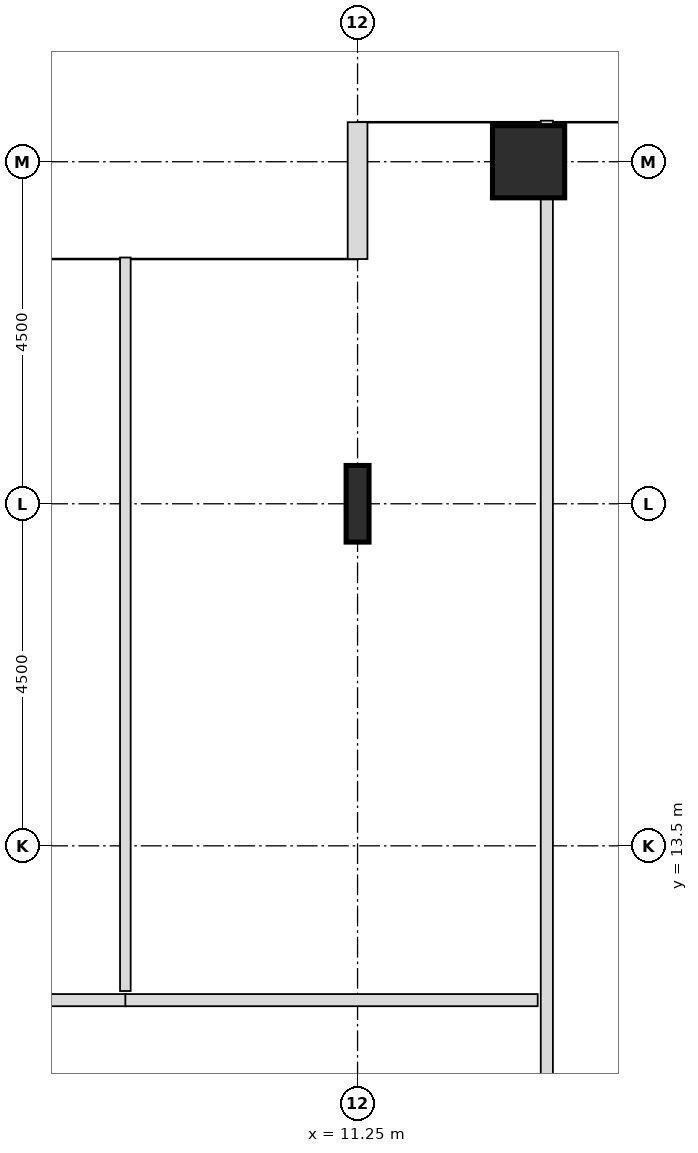
"""IFC4 building model, lengths in metres.
Left out: names, types, materials, properties, quantities, classifications, styles, units other than length and angle.
Written with IfcOpenShell. Run it as: python <this file> out.ifc"""

import sys

from ifc_helpers import new_model, si_unit, direction, frame, frame_2d, origin, origin_2d, place, context, subcontext, project, spatial, rectangle, hollow_rectangle, i_section, extrude, source, transform, mapped, element, fill, save


model = new_model("IFC4")
c1 = context("Model", 3, precision=1e-05, world=origin(), true_north=direction((0.0, 1.0)))
c2 = subcontext(c1, "Body", "Model", "MODEL_VIEW")
j1 = project(units=[si_unit("LENGTHUNIT", "METRE"), si_unit("PLANEANGLEUNIT", "RADIAN")], contexts=[c1])
p1 = place(None, origin())
s1 = spatial("IfcSite", under=j1, at=p1, CompositionType="ELEMENT")
p2 = place(p1, origin())
s2 = spatial("IfcBuilding", under=s1, at=p2, CompositionType="ELEMENT")
p3 = place(p2, frame((0.0, 0.0, 40.6)))
s3 = spatial("IfcBuildingStorey", under=s2, at=p3, CompositionType="ELEMENT", Elevation=40.6)
m1 = source(origin(), c2, "Body", "SweptSolid", [
    extrude(i_section(OverallWidth=0.302, OverallDepth=1.008, WebThickness=0.021, FlangeThickness=0.04, FilletRadius=0.03, at=origin_2d()), origin(), (0.0, 0.0, 1.0), 3.8),
])
p4 = place(p3, frame((11.25, 18.0, 0.0), z_axis=(0.0, 0.0, 1.0), x_axis=(1.0, 0.0, 0.0)))
e1 = element("IfcColumn", 1, at=p4, inside=s3, PredefinedType="COLUMN", context=c2, shape_type="MappedRepresentation", body=[
    mapped(m1, transform((0.0, 0.0, 0.0), x_axis=(1.0, 0.0, 0.0), y_axis=(0.0, 1.0, 0.0), z_axis=(0.0, 0.0, 1.0), scale=1.0)),
])
m2 = source(origin(), c2, "Body", "SweptSolid", [
    extrude(hollow_rectangle(XDim=0.95, YDim=0.95, WallThickness=0.045, InnerFilletRadius=0.045, OuterFilletRadius=0.09, at=origin_2d()), origin(), (0.0, 0.0, 1.0), 3.8),
])
p5 = place(p3, frame((13.5, 22.5, 0.0), z_axis=(0.0, 0.0, 1.0), x_axis=(1.0, 0.0, 0.0)))
e2 = element("IfcColumn", 2, at=p5, inside=s3, PredefinedType="COLUMN", context=c2, shape_type="MappedRepresentation", body=[
    mapped(m2, transform((0.0, 0.0, 0.0), x_axis=(1.0, 0.0, 0.0), y_axis=(0.0, 1.0, 0.0), z_axis=(0.0, 0.0, 1.0), scale=1.0)),
])
m3 = source(origin(), c2, "Body", "SweptSolid", [
    extrude(rectangle(XDim=1.8, YDim=0.26, at=frame_2d((0.9, 0.0))), origin(), (0.0, 0.0, 1.0), 3.55),
])
p6 = place(p3, frame((11.25, 23.02, 0.0), z_axis=(0.0, 0.0, 1.0), x_axis=(0.0, -1.0, 0.0)))
e3 = element("IfcWall", 3, at=p6, inside=s3, PredefinedType="SOLIDWALL", context=c2, shape_type="MappedRepresentation", body=[
    mapped(m3, transform((0.0, 0.0, 0.0), x_axis=(1.0, 0.0, 0.0), y_axis=(0.0, 1.0, 0.0), z_axis=(0.0, 0.0, 1.0), scale=1.0)),
])
m4 = source(origin(), c2, "Body", "SweptSolid", [
    extrude(rectangle(XDim=14.545, YDim=0.16, at=frame_2d((7.272, 0.0))), origin(), (0.0, 0.0, 1.0), 3.535),
])
p7 = place(p3, frame((13.74, 8.495, 0.0), z_axis=(0.0, 0.0, 1.0), x_axis=(0.0, 1.0, 0.0)))
e4 = element("IfcWall", 4, at=p7, inside=s3, PredefinedType="PARTITIONING", context=c2, shape_type="MappedRepresentation", body=[
    mapped(m4, transform((0.0, 0.0, 0.0), x_axis=(1.0, 0.0, 0.0), y_axis=(0.0, 1.0, 0.0), z_axis=(0.0, 0.0, 1.0), scale=1.0)),
])
p8 = place(p7, frame((1.032, 0.0, 0.0)))
e5 = element("IfcOpeningElement", 5, at=p8, cuts=e4, PredefinedType="OPENING", context=c2, shape_type="SweptSolid", body=[
    extrude(rectangle(XDim=0.95, YDim=2.1, at=frame_2d((0.475, 1.05))), frame((0.0, 0.09, 0.0), z_axis=(0.0, -1.0, 0.0), x_axis=(1.0, 0.0, 0.0)), (0.0, 0.0, 1.0), 0.18),
])
m5 = source(origin(), c2, "Body", "SweptSolid", [
    extrude(rectangle(XDim=5.81, YDim=0.16, at=frame_2d((2.905, 0.0))), origin(), (0.0, 0.0, 1.0), 3.535),
])
p9 = place(p3, frame((2.395, 11.47, 0.0), z_axis=(0.0, 0.0, 1.0), x_axis=(1.0, 0.0, 0.0)))
e6 = element("IfcWall", 6, at=p9, inside=s3, PredefinedType="PARTITIONING", context=c2, shape_type="MappedRepresentation", body=[
    mapped(m5, transform((0.0, 0.0, 0.0), x_axis=(1.0, 0.0, 0.0), y_axis=(0.0, 1.0, 0.0), z_axis=(0.0, 0.0, 1.0), scale=1.0)),
])
p10 = place(p9, frame((2.43, 0.0, 0.0)))
e7 = element("IfcOpeningElement", 7, at=p10, cuts=e6, PredefinedType="OPENING", context=c2, shape_type="SweptSolid", body=[
    extrude(rectangle(XDim=0.95, YDim=2.1, at=frame_2d((0.475, 1.05))), frame((0.0, 0.09, 0.0), z_axis=(0.0, -1.0, 0.0), x_axis=(1.0, 0.0, 0.0)), (0.0, 0.0, 1.0), 0.18),
])
m6 = source(origin(), c2, "Body", "SweptSolid", [
    extrude(rectangle(XDim=9.65, YDim=0.14, at=frame_2d((4.825, 0.0))), origin(), (0.0, 0.0, 1.0), 3.535),
])
p11 = place(p3, frame((8.195, 11.59, 0.0), z_axis=(0.0, 0.0, 1.0), x_axis=(0.0, 1.0, 0.0)))
e8 = element("IfcWall", 8, at=p11, inside=s3, PredefinedType="PARTITIONING", context=c2, shape_type="MappedRepresentation", body=[
    mapped(m6, transform((0.0, 0.0, 0.0), x_axis=(1.0, 0.0, 0.0), y_axis=(0.0, 1.0, 0.0), z_axis=(0.0, 0.0, 1.0), scale=1.0)),
])
m7 = source(origin(), c2, "Body", "SweptSolid", [
    extrude(rectangle(XDim=5.425, YDim=0.16, at=frame_2d((2.712, 0.0))), origin(), (0.0, 0.0, 1.0), 3.535),
])
p12 = place(p3, frame((8.195, 11.47, 0.0), z_axis=(0.0, 0.0, 1.0), x_axis=(1.0, 0.0, 0.0)))
e9 = element("IfcWall", 9, at=p12, inside=s3, PredefinedType="PARTITIONING", context=c2, shape_type="MappedRepresentation", body=[
    mapped(m7, transform((0.0, 0.0, 0.0), x_axis=(1.0, 0.0, 0.0), y_axis=(0.0, 1.0, 0.0), z_axis=(0.0, 0.0, 1.0), scale=1.0)),
])
p13 = place(p12, frame((2.238, 0.0, 0.0)))
e10 = element("IfcOpeningElement", 10, at=p13, cuts=e9, PredefinedType="OPENING", context=c2, shape_type="SweptSolid", body=[
    extrude(rectangle(XDim=0.95, YDim=2.1, at=frame_2d((0.475, 1.05))), frame((0.0, 0.09, 0.0), z_axis=(0.0, -1.0, 0.0), x_axis=(1.0, 0.0, 0.0)), (0.0, 0.0, 1.0), 0.18),
])
m8 = source(origin(), c2, "Body", "SweptSolid", [
    extrude(rectangle(XDim=0.95, YDim=2.1, at=frame_2d((0.475, 1.05))), frame((0.0, 0.025, 0.0), z_axis=(0.0, -1.0, 0.0), x_axis=(1.0, 0.0, 0.0)), (0.0, 0.0, 1.0), 0.05),
])
p14 = place(p13, origin())
e11 = element("IfcDoor", 11, at=p14, inside=s3, OperationType="SINGLE_SWING_LEFT", PredefinedType="DOOR", context=c2, shape_type="MappedRepresentation", body=[
    mapped(m8, transform((0.0, 0.0, 0.0), x_axis=(1.0, 0.0, 0.0), y_axis=(0.0, 1.0, 0.0), z_axis=(0.0, 0.0, 1.0), scale=1.0)),
])
fill(e10, e11)
save(model, sys.argv[1])
